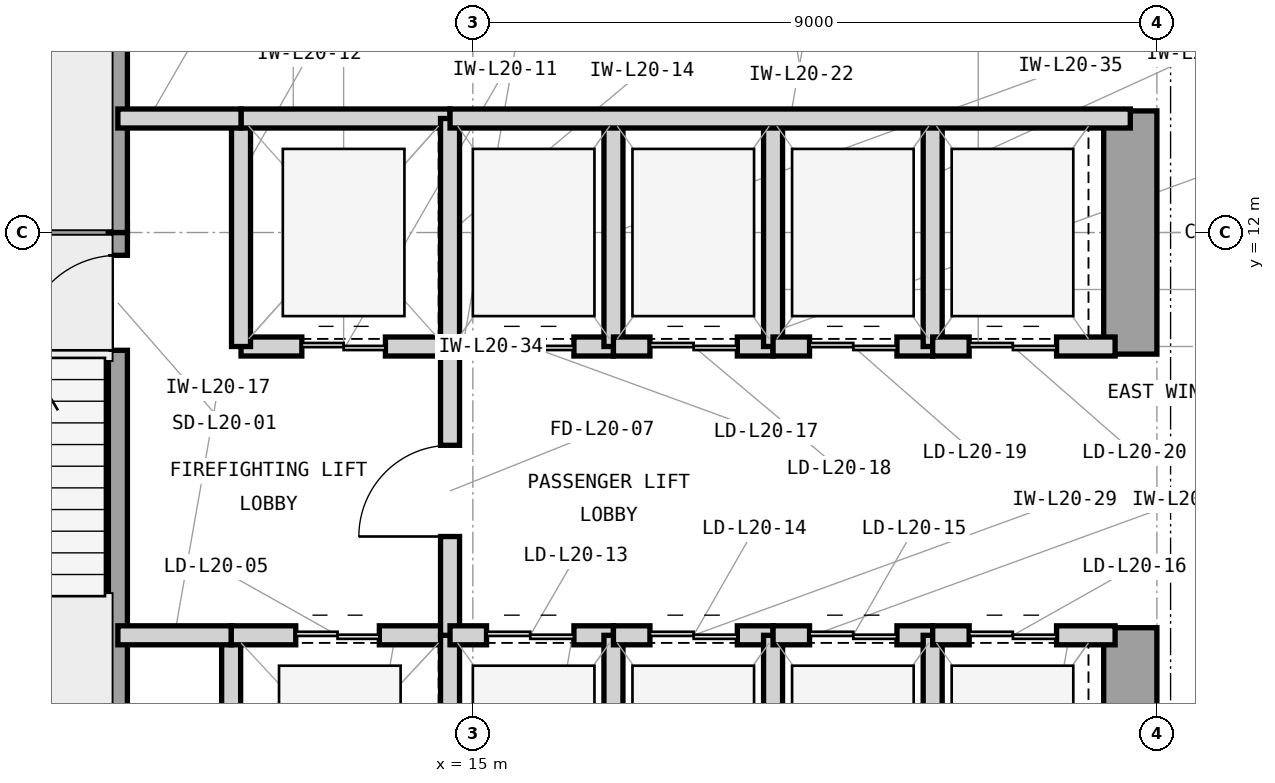
"""IFC4 building model, lengths in metres.
Left out: names, types, materials, properties, quantities, classifications, styles, units other than length and angle.
Written with IfcOpenShell. Run it as: python <this file> out.ifc"""

import sys

from ifc_helpers import new_model, si_unit, direction, frame, frame_2d, origin, place, context, subcontext, project, spatial, rectangle, extrude, element, fill, save


model = new_model("IFC4")
c1 = context("Model", 3, precision=1e-05, world=origin(), true_north=direction((0.0, 1.0)))
c2 = subcontext(c1, "Body", "Model", "MODEL_VIEW")
j1 = project(units=[si_unit("LENGTHUNIT", "METRE"), si_unit("PLANEANGLEUNIT", "RADIAN")], contexts=[c1])
p1 = place(None, origin())
s1 = spatial("IfcSite", under=j1, at=p1, CompositionType="ELEMENT")
p2 = place(p1, origin())
s2 = spatial("IfcBuilding", under=s1, at=p2, CompositionType="ELEMENT")
p3 = place(p2, frame((0.0, 0.0, 89.1)))
s3 = spatial("IfcBuildingStorey", under=s2, at=p3, CompositionType="ELEMENT", Elevation=89.1)
p4 = place(p3, frame((23.65, 3.7, 0.0), z_axis=(0.0, 0.0, 1.0), x_axis=(0.0, 1.0, 0.0)))
e1 = element("IfcWall", 1, at=p4, inside=s3, PredefinedType="SHEAR", context=c2, shape_type="SweptSolid", body=[
    extrude(rectangle(XDim=3.1, YDim=0.7, at=frame_2d((1.55, 0.0))), origin(), (0.0, 0.0, 1.0), 4.2),
])
p5 = place(p3, frame((23.65, 10.4, 0.0), z_axis=(0.0, 0.0, 1.0), x_axis=(0.0, 1.0, 0.0)))
e2 = element("IfcWall", 2, at=p5, inside=s3, PredefinedType="SHEAR", context=c2, shape_type="SweptSolid", body=[
    extrude(rectangle(XDim=3.2, YDim=0.7, at=frame_2d((1.6, 0.0))), origin(), (0.0, 0.0, 1.0), 4.2),
])
p6 = place(p3, frame((6.35, 12.0, 0.0), z_axis=(0.0, 0.0, 1.0), x_axis=(1.0, 0.0, 0.0)))
e3 = element("IfcWall", 3, at=p6, inside=s3, PredefinedType="SHEAR", context=c2, shape_type="SweptSolid", body=[
    extrude(rectangle(XDim=4.105, YDim=0.25, at=frame_2d((2.052, 0.0))), origin(), (0.0, 0.0, 1.0), 4.2),
])
p7 = place(p3, frame((10.33, 4.55, 0.0), z_axis=(0.0, 0.0, 1.0), x_axis=(0.0, 1.0, 0.0)))
e4 = element("IfcWall", 4, at=p7, inside=s3, PredefinedType="SHEAR", context=c2, shape_type="SweptSolid", body=[
    extrude(rectangle(XDim=7.45, YDim=0.25, at=frame_2d((3.725, 0.0))), origin(), (0.0, 0.0, 1.0), 4.2),
])
p8 = place(p7, frame((5.9, 0.0, 0.0)))
e5 = element("IfcOpeningElement", 5, at=p8, cuts=e4, PredefinedType="OPENING", context=c2, shape_type="SweptSolid", body=[
    extrude(rectangle(XDim=1.25, YDim=2.2, at=frame_2d((0.625, 1.1))), frame((0.0, 0.135, 0.0), z_axis=(0.0, -1.0, 0.0), x_axis=(1.0, 0.0, 0.0)), (0.0, 0.0, 1.0), 0.27),
])
p9 = place(p3, frame((10.33, 12.0, 0.0), z_axis=(0.0, 0.0, 1.0), x_axis=(0.0, 1.0, 0.0)))
e6 = element("IfcWall", 6, at=p9, inside=s3, PredefinedType="SHEAR", context=c2, shape_type="SweptSolid", body=[
    extrude(rectangle(XDim=7.45, YDim=0.25, at=frame_2d((3.725, 0.0))), origin(), (0.0, 0.0, 1.0), 4.2),
])
p10 = place(p9, frame((5.85, 0.0, 0.0)))
e7 = element("IfcOpeningElement", 7, at=p10, cuts=e6, PredefinedType="OPENING", context=c2, shape_type="SweptSolid", body=[
    extrude(rectangle(XDim=1.25, YDim=2.2, at=frame_2d((0.625, 1.1))), frame((0.0, 0.135, 0.0), z_axis=(0.0, -1.0, 0.0), x_axis=(1.0, 0.0, 0.0)), (0.0, 0.0, 1.0), 0.27),
])
p11 = place(p3, frame((11.82, 3.35, 0.0), z_axis=(0.0, 0.0, 1.0), x_axis=(0.0, 1.0, 0.0)))
e8 = element("IfcWall", 8, at=p11, inside=s3, PredefinedType="PARTITIONING", context=c2, shape_type="SweptSolid", body=[
    extrude(rectangle(XDim=3.35, YDim=0.25, at=frame_2d((1.675, 0.0))), origin(), (0.0, 0.0, 1.0), 3.93),
])
p12 = place(p3, frame((11.82, 6.7, 0.0), z_axis=(0.0, 0.0, 1.0), x_axis=(1.0, 0.0, 0.0)))
e9 = element("IfcWall", 9, at=p12, inside=s3, PredefinedType="PARTITIONING", context=c2, shape_type="SweptSolid", body=[
    extrude(rectangle(XDim=2.88, YDim=0.25, at=frame_2d((1.44, 0.0))), origin(), (0.0, 0.0, 1.0), 3.527),
])
p13 = place(p12, frame((0.85, 0.0, 0.0)))
e10 = element("IfcOpeningElement", 10, at=p13, cuts=e9, PredefinedType="OPENING", context=c2, shape_type="SweptSolid", body=[
    extrude(rectangle(XDim=1.1, YDim=2.25, at=frame_2d((0.55, 1.125))), frame((0.0, 0.135, 0.0), z_axis=(0.0, -1.0, 0.0), x_axis=(1.0, 0.0, 0.0)), (0.0, 0.0, 1.0), 0.27),
])
p14 = place(p3, frame((14.7, 3.35, 0.0), z_axis=(0.0, 0.0, 1.0), x_axis=(0.0, 1.0, 0.0)))
e11 = element("IfcWall", 11, at=p14, inside=s3, PredefinedType="PARTITIONING", context=c2, shape_type="SweptSolid", body=[
    extrude(rectangle(XDim=3.35, YDim=0.25, at=frame_2d((1.675, 0.0))), origin(), (0.0, 0.0, 1.0), 3.93),
])
p15 = place(p3, frame((11.95, 10.5, 0.0), z_axis=(0.0, 0.0, 1.0), x_axis=(1.0, 0.0, 0.0)))
e12 = element("IfcWall", 12, at=p15, inside=s3, PredefinedType="PARTITIONING", context=c2, shape_type="SweptSolid", body=[
    extrude(rectangle(XDim=2.75, YDim=0.25, at=frame_2d((1.375, 0.0))), origin(), (0.0, 0.0, 1.0), 3.527),
])
p16 = place(p15, frame((0.8, 0.0, 0.0)))
e13 = element("IfcOpeningElement", 13, at=p16, cuts=e12, PredefinedType="OPENING", context=c2, shape_type="SweptSolid", body=[
    extrude(rectangle(XDim=1.1, YDim=2.25, at=frame_2d((0.55, 1.125))), frame((0.0, 0.135, 0.0), z_axis=(0.0, -1.0, 0.0), x_axis=(1.0, 0.0, 0.0)), (0.0, 0.0, 1.0), 0.27),
])
p17 = place(p3, frame((11.95, 10.5, 0.0), z_axis=(0.0, 0.0, 1.0), x_axis=(0.0, 1.0, 0.0)))
e14 = element("IfcWall", 14, at=p17, inside=s3, PredefinedType="PARTITIONING", context=c2, shape_type="SweptSolid", body=[
    extrude(rectangle(XDim=3.0, YDim=0.25, at=frame_2d((1.5, 0.0))), origin(), (0.0, 0.0, 1.0), 3.93),
])
p18 = place(p3, frame((11.95, 13.5, 0.0), z_axis=(0.0, 0.0, 1.0), x_axis=(1.0, 0.0, 0.0)))
e15 = element("IfcWall", 15, at=p18, inside=s3, PredefinedType="PARTITIONING", context=c2, shape_type="SweptSolid", body=[
    extrude(rectangle(XDim=2.75, YDim=0.25, at=frame_2d((1.375, 0.0))), origin(), (0.0, 0.0, 1.0), 3.527),
])
p19 = place(p3, frame((14.7, 10.5, 0.0), z_axis=(0.0, 0.0, 1.0), x_axis=(0.0, 1.0, 0.0)))
e16 = element("IfcWall", 16, at=p19, inside=s3, PredefinedType="PARTITIONING", context=c2, shape_type="SweptSolid", body=[
    extrude(rectangle(XDim=3.0, YDim=0.25, at=frame_2d((1.5, 0.0))), origin(), (0.0, 0.0, 1.0), 3.93),
])
p20 = place(p3, frame((14.7, 6.7, 0.0), z_axis=(0.0, 0.0, 1.0), x_axis=(0.0, 1.0, 0.0)))
e17 = element("IfcWall", 17, at=p20, inside=s3, PredefinedType="PARTITIONING", context=c2, shape_type="SweptSolid", body=[
    extrude(rectangle(XDim=3.8, YDim=0.25, at=frame_2d((1.9, 0.0))), origin(), (0.0, 0.0, 1.0), 3.93),
])
p21 = place(p20, frame((1.3, 0.0, 0.0)))
e18 = element("IfcOpeningElement", 18, at=p21, cuts=e17, PredefinedType="OPENING", context=c2, shape_type="SweptSolid", body=[
    extrude(rectangle(XDim=1.2, YDim=2.2, at=frame_2d((0.6, 1.1))), frame((0.0, 0.135, 0.0), z_axis=(0.0, -1.0, 0.0), x_axis=(1.0, 0.0, 0.0)), (0.0, 0.0, 1.0), 0.27),
])
p22 = place(p3, frame((10.33, 13.5, 0.0), z_axis=(0.0, 0.0, 1.0), x_axis=(1.0, 0.0, 0.0)))
e19 = element("IfcWall", 19, at=p22, inside=s3, PredefinedType="PARTITIONING", context=c2, shape_type="SweptSolid", body=[
    extrude(rectangle(XDim=1.62, YDim=0.25, at=frame_2d((0.81, 0.0))), origin(), (0.0, 0.0, 1.0), 3.527),
])
p23 = place(p3, frame((10.33, 6.7, 0.0), z_axis=(0.0, 0.0, 1.0), x_axis=(1.0, 0.0, 0.0)))
e20 = element("IfcWall", 20, at=p23, inside=s3, PredefinedType="PARTITIONING", context=c2, shape_type="SweptSolid", body=[
    extrude(rectangle(XDim=1.49, YDim=0.25, at=frame_2d((0.745, 0.0))), origin(), (0.0, 0.0, 1.0), 3.527),
])
p24 = place(p3, frame((14.7, 6.7, 0.0), z_axis=(0.0, 0.0, 1.0), x_axis=(1.0, 0.0, 0.0)))
e21 = element("IfcWall", 21, at=p24, inside=s3, PredefinedType="PARTITIONING", context=c2, shape_type="SweptSolid", body=[
    extrude(rectangle(XDim=2.15, YDim=0.25, at=frame_2d((1.075, 0.0))), origin(), (0.0, 0.0, 1.0), 3.527),
])
p25 = place(p24, frame((0.48, 0.0, 0.0)))
e22 = element("IfcOpeningElement", 22, at=p25, cuts=e21, PredefinedType="OPENING", context=c2, shape_type="SweptSolid", body=[
    extrude(rectangle(XDim=1.15, YDim=2.25, at=frame_2d((0.575, 1.125))), frame((0.0, 0.135, 0.0), z_axis=(0.0, -1.0, 0.0), x_axis=(1.0, 0.0, 0.0)), (0.0, 0.0, 1.0), 0.27),
])
p26 = place(p3, frame((16.85, 3.35, 0.0), z_axis=(0.0, 0.0, 1.0), x_axis=(0.0, 1.0, 0.0)))
e23 = element("IfcWall", 23, at=p26, inside=s3, PredefinedType="PARTITIONING", context=c2, shape_type="SweptSolid", body=[
    extrude(rectangle(XDim=3.35, YDim=0.25, at=frame_2d((1.675, 0.0))), origin(), (0.0, 0.0, 1.0), 3.93),
])
p27 = place(p3, frame((16.85, 6.7, 0.0), z_axis=(0.0, 0.0, 1.0), x_axis=(1.0, 0.0, 0.0)))
e24 = element("IfcWall", 24, at=p27, inside=s3, PredefinedType="PARTITIONING", context=c2, shape_type="SweptSolid", body=[
    extrude(rectangle(XDim=2.1, YDim=0.25, at=frame_2d((1.05, 0.0))), origin(), (0.0, 0.0, 1.0), 3.527),
])
p28 = place(p27, frame((0.48, 0.0, 0.0)))
e25 = element("IfcOpeningElement", 25, at=p28, cuts=e24, PredefinedType="OPENING", context=c2, shape_type="SweptSolid", body=[
    extrude(rectangle(XDim=1.15, YDim=2.25, at=frame_2d((0.575, 1.125))), frame((0.0, 0.135, 0.0), z_axis=(0.0, -1.0, 0.0), x_axis=(1.0, 0.0, 0.0)), (0.0, 0.0, 1.0), 0.27),
])
p29 = place(p3, frame((18.95, 3.35, 0.0), z_axis=(0.0, 0.0, 1.0), x_axis=(0.0, 1.0, 0.0)))
e26 = element("IfcWall", 26, at=p29, inside=s3, PredefinedType="PARTITIONING", context=c2, shape_type="SweptSolid", body=[
    extrude(rectangle(XDim=3.35, YDim=0.25, at=frame_2d((1.675, 0.0))), origin(), (0.0, 0.0, 1.0), 3.93),
])
p30 = place(p3, frame((18.95, 6.7, 0.0), z_axis=(0.0, 0.0, 1.0), x_axis=(1.0, 0.0, 0.0)))
e27 = element("IfcWall", 27, at=p30, inside=s3, PredefinedType="PARTITIONING", context=c2, shape_type="SweptSolid", body=[
    extrude(rectangle(XDim=2.1, YDim=0.25, at=frame_2d((1.05, 0.0))), origin(), (0.0, 0.0, 1.0), 3.527),
])
p31 = place(p30, frame((0.48, 0.0, 0.0)))
e28 = element("IfcOpeningElement", 28, at=p31, cuts=e27, PredefinedType="OPENING", context=c2, shape_type="SweptSolid", body=[
    extrude(rectangle(XDim=1.15, YDim=2.25, at=frame_2d((0.575, 1.125))), frame((0.0, 0.135, 0.0), z_axis=(0.0, -1.0, 0.0), x_axis=(1.0, 0.0, 0.0)), (0.0, 0.0, 1.0), 0.27),
])
p32 = place(p3, frame((21.05, 3.35, 0.0), z_axis=(0.0, 0.0, 1.0), x_axis=(0.0, 1.0, 0.0)))
e29 = element("IfcWall", 29, at=p32, inside=s3, PredefinedType="PARTITIONING", context=c2, shape_type="SweptSolid", body=[
    extrude(rectangle(XDim=3.35, YDim=0.25, at=frame_2d((1.675, 0.0))), origin(), (0.0, 0.0, 1.0), 3.93),
])
p33 = place(p3, frame((21.05, 6.7, 0.0), z_axis=(0.0, 0.0, 1.0), x_axis=(1.0, 0.0, 0.0)))
e30 = element("IfcWall", 30, at=p33, inside=s3, PredefinedType="PARTITIONING", context=c2, shape_type="SweptSolid", body=[
    extrude(rectangle(XDim=2.4, YDim=0.25, at=frame_2d((1.2, 0.0))), origin(), (0.0, 0.0, 1.0), 3.527),
])
p34 = place(p33, frame((0.48, 0.0, 0.0)))
e31 = element("IfcOpeningElement", 31, at=p34, cuts=e30, PredefinedType="OPENING", context=c2, shape_type="SweptSolid", body=[
    extrude(rectangle(XDim=1.15, YDim=2.25, at=frame_2d((0.575, 1.125))), frame((0.0, 0.135, 0.0), z_axis=(0.0, -1.0, 0.0), x_axis=(1.0, 0.0, 0.0)), (0.0, 0.0, 1.0), 0.27),
])
p35 = place(p3, frame((14.7, 10.5, 0.0), z_axis=(0.0, 0.0, 1.0), x_axis=(1.0, 0.0, 0.0)))
e32 = element("IfcWall", 32, at=p35, inside=s3, PredefinedType="PARTITIONING", context=c2, shape_type="SweptSolid", body=[
    extrude(rectangle(XDim=2.15, YDim=0.25, at=frame_2d((1.075, 0.0))), origin(), (0.0, 0.0, 1.0), 3.527),
])
p36 = place(p35, frame((0.48, 0.0, 0.0)))
e33 = element("IfcOpeningElement", 33, at=p36, cuts=e32, PredefinedType="OPENING", context=c2, shape_type="SweptSolid", body=[
    extrude(rectangle(XDim=1.15, YDim=2.25, at=frame_2d((0.575, 1.125))), frame((0.0, 0.135, 0.0), z_axis=(0.0, -1.0, 0.0), x_axis=(1.0, 0.0, 0.0)), (0.0, 0.0, 1.0), 0.27),
])
p37 = place(p3, frame((16.85, 10.5, 0.0), z_axis=(0.0, 0.0, 1.0), x_axis=(0.0, 1.0, 0.0)))
e34 = element("IfcWall", 34, at=p37, inside=s3, PredefinedType="PARTITIONING", context=c2, shape_type="SweptSolid", body=[
    extrude(rectangle(XDim=3.0, YDim=0.25, at=frame_2d((1.5, 0.0))), origin(), (0.0, 0.0, 1.0), 3.93),
])
p38 = place(p3, frame((16.85, 10.5, 0.0), z_axis=(0.0, 0.0, 1.0), x_axis=(1.0, 0.0, 0.0)))
e35 = element("IfcWall", 35, at=p38, inside=s3, PredefinedType="PARTITIONING", context=c2, shape_type="SweptSolid", body=[
    extrude(rectangle(XDim=2.1, YDim=0.25, at=frame_2d((1.05, 0.0))), origin(), (0.0, 0.0, 1.0), 3.527),
])
p39 = place(p38, frame((0.48, 0.0, 0.0)))
e36 = element("IfcOpeningElement", 36, at=p39, cuts=e35, PredefinedType="OPENING", context=c2, shape_type="SweptSolid", body=[
    extrude(rectangle(XDim=1.15, YDim=2.25, at=frame_2d((0.575, 1.125))), frame((0.0, 0.135, 0.0), z_axis=(0.0, -1.0, 0.0), x_axis=(1.0, 0.0, 0.0)), (0.0, 0.0, 1.0), 0.27),
])
p40 = place(p3, frame((18.95, 10.5, 0.0), z_axis=(0.0, 0.0, 1.0), x_axis=(0.0, 1.0, 0.0)))
e37 = element("IfcWall", 37, at=p40, inside=s3, PredefinedType="PARTITIONING", context=c2, shape_type="SweptSolid", body=[
    extrude(rectangle(XDim=3.0, YDim=0.25, at=frame_2d((1.5, 0.0))), origin(), (0.0, 0.0, 1.0), 3.93),
])
p41 = place(p3, frame((18.95, 10.5, 0.0), z_axis=(0.0, 0.0, 1.0), x_axis=(1.0, 0.0, 0.0)))
e38 = element("IfcWall", 38, at=p41, inside=s3, PredefinedType="PARTITIONING", context=c2, shape_type="SweptSolid", body=[
    extrude(rectangle(XDim=2.1, YDim=0.25, at=frame_2d((1.05, 0.0))), origin(), (0.0, 0.0, 1.0), 3.527),
])
p42 = place(p41, frame((0.48, 0.0, 0.0)))
e39 = element("IfcOpeningElement", 39, at=p42, cuts=e38, PredefinedType="OPENING", context=c2, shape_type="SweptSolid", body=[
    extrude(rectangle(XDim=1.15, YDim=2.25, at=frame_2d((0.575, 1.125))), frame((0.0, 0.135, 0.0), z_axis=(0.0, -1.0, 0.0), x_axis=(1.0, 0.0, 0.0)), (0.0, 0.0, 1.0), 0.27),
])
p43 = place(p3, frame((21.05, 10.5, 0.0), z_axis=(0.0, 0.0, 1.0), x_axis=(0.0, 1.0, 0.0)))
e40 = element("IfcWall", 40, at=p43, inside=s3, PredefinedType="PARTITIONING", context=c2, shape_type="SweptSolid", body=[
    extrude(rectangle(XDim=3.0, YDim=0.25, at=frame_2d((1.5, 0.0))), origin(), (0.0, 0.0, 1.0), 3.93),
])
p44 = place(p3, frame((21.05, 10.5, 0.0), z_axis=(0.0, 0.0, 1.0), x_axis=(1.0, 0.0, 0.0)))
e41 = element("IfcWall", 41, at=p44, inside=s3, PredefinedType="PARTITIONING", context=c2, shape_type="SweptSolid", body=[
    extrude(rectangle(XDim=2.4, YDim=0.25, at=frame_2d((1.2, 0.0))), origin(), (0.0, 0.0, 1.0), 3.527),
])
p45 = place(p44, frame((0.48, 0.0, 0.0)))
e42 = element("IfcOpeningElement", 42, at=p45, cuts=e41, PredefinedType="OPENING", context=c2, shape_type="SweptSolid", body=[
    extrude(rectangle(XDim=1.15, YDim=2.25, at=frame_2d((0.575, 1.125))), frame((0.0, 0.135, 0.0), z_axis=(0.0, -1.0, 0.0), x_axis=(1.0, 0.0, 0.0)), (0.0, 0.0, 1.0), 0.27),
])
p46 = place(p3, frame((14.7, 13.5, 0.0), z_axis=(0.0, 0.0, 1.0), x_axis=(1.0, 0.0, 0.0)))
e43 = element("IfcWall", 43, at=p46, inside=s3, PredefinedType="PARTITIONING", context=c2, shape_type="SweptSolid", body=[
    extrude(rectangle(XDim=8.95, YDim=0.25, at=frame_2d((4.475, 0.0))), origin(), (0.0, 0.0, 1.0), 3.527),
])
p47 = place(p8, origin())
e44 = element("IfcDoor", 44, at=p47, inside=s3, OperationType="SINGLE_SWING_LEFT", PredefinedType="DOOR", context=c2, shape_type="SweptSolid", body=[
    extrude(rectangle(XDim=1.25, YDim=2.2, at=frame_2d((0.625, 1.1))), frame((0.0, 0.025, 0.0), z_axis=(0.0, -1.0, 0.0), x_axis=(1.0, 0.0, 0.0)), (0.0, 0.0, 1.0), 0.05),
])
fill(e5, e44)
p48 = place(p13, origin())
e45 = element("IfcDoor", 45, at=p48, inside=s3, OperationType="DOUBLE_DOOR_SLIDING", PredefinedType="DOOR", context=c2, shape_type="SweptSolid", body=[
    extrude(rectangle(XDim=1.1, YDim=2.25, at=frame_2d((0.55, 1.125))), frame((0.0, 0.025, 0.0), z_axis=(0.0, -1.0, 0.0), x_axis=(1.0, 0.0, 0.0)), (0.0, 0.0, 1.0), 0.05),
])
fill(e10, e45)
p49 = place(p16, origin())
e46 = element("IfcDoor", 46, at=p49, inside=s3, OperationType="DOUBLE_DOOR_SLIDING", PredefinedType="DOOR", context=c2, shape_type="SweptSolid", body=[
    extrude(rectangle(XDim=1.1, YDim=2.25, at=frame_2d((0.55, 1.125))), frame((0.0, 0.025, 0.0), z_axis=(0.0, -1.0, 0.0), x_axis=(1.0, 0.0, 0.0)), (0.0, 0.0, 1.0), 0.05),
])
fill(e13, e46)
p50 = place(p21, origin())
e47 = element("IfcDoor", 47, at=p50, inside=s3, OperationType="SINGLE_SWING_LEFT", PredefinedType="DOOR", context=c2, shape_type="SweptSolid", body=[
    extrude(rectangle(XDim=1.2, YDim=2.2, at=frame_2d((0.6, 1.1))), frame((0.0, 0.025, 0.0), z_axis=(0.0, -1.0, 0.0), x_axis=(1.0, 0.0, 0.0)), (0.0, 0.0, 1.0), 0.05),
])
fill(e18, e47)
p51 = place(p25, origin())
e48 = element("IfcDoor", 48, at=p51, inside=s3, OperationType="DOUBLE_DOOR_SLIDING", PredefinedType="DOOR", context=c2, shape_type="SweptSolid", body=[
    extrude(rectangle(XDim=1.15, YDim=2.25, at=frame_2d((0.575, 1.125))), frame((0.0, 0.025, 0.0), z_axis=(0.0, -1.0, 0.0), x_axis=(1.0, 0.0, 0.0)), (0.0, 0.0, 1.0), 0.05),
])
fill(e22, e48)
p52 = place(p28, origin())
e49 = element("IfcDoor", 49, at=p52, inside=s3, OperationType="DOUBLE_DOOR_SLIDING", PredefinedType="DOOR", context=c2, shape_type="SweptSolid", body=[
    extrude(rectangle(XDim=1.15, YDim=2.25, at=frame_2d((0.575, 1.125))), frame((0.0, 0.025, 0.0), z_axis=(0.0, -1.0, 0.0), x_axis=(1.0, 0.0, 0.0)), (0.0, 0.0, 1.0), 0.05),
])
fill(e25, e49)
p53 = place(p31, origin())
e50 = element("IfcDoor", 50, at=p53, inside=s3, OperationType="DOUBLE_DOOR_SLIDING", PredefinedType="DOOR", context=c2, shape_type="SweptSolid", body=[
    extrude(rectangle(XDim=1.15, YDim=2.25, at=frame_2d((0.575, 1.125))), frame((0.0, 0.025, 0.0), z_axis=(0.0, -1.0, 0.0), x_axis=(1.0, 0.0, 0.0)), (0.0, 0.0, 1.0), 0.05),
])
fill(e28, e50)
p54 = place(p34, origin())
e51 = element("IfcDoor", 51, at=p54, inside=s3, OperationType="DOUBLE_DOOR_SLIDING", PredefinedType="DOOR", context=c2, shape_type="SweptSolid", body=[
    extrude(rectangle(XDim=1.15, YDim=2.25, at=frame_2d((0.575, 1.125))), frame((0.0, 0.025, 0.0), z_axis=(0.0, -1.0, 0.0), x_axis=(1.0, 0.0, 0.0)), (0.0, 0.0, 1.0), 0.05),
])
fill(e31, e51)
p55 = place(p36, origin())
e52 = element("IfcDoor", 52, at=p55, inside=s3, OperationType="DOUBLE_DOOR_SLIDING", PredefinedType="DOOR", context=c2, shape_type="SweptSolid", body=[
    extrude(rectangle(XDim=1.15, YDim=2.25, at=frame_2d((0.575, 1.125))), frame((0.0, 0.025, 0.0), z_axis=(0.0, -1.0, 0.0), x_axis=(1.0, 0.0, 0.0)), (0.0, 0.0, 1.0), 0.05),
])
fill(e33, e52)
p56 = place(p39, origin())
e53 = element("IfcDoor", 53, at=p56, inside=s3, OperationType="DOUBLE_DOOR_SLIDING", PredefinedType="DOOR", context=c2, shape_type="SweptSolid", body=[
    extrude(rectangle(XDim=1.15, YDim=2.25, at=frame_2d((0.575, 1.125))), frame((0.0, 0.025, 0.0), z_axis=(0.0, -1.0, 0.0), x_axis=(1.0, 0.0, 0.0)), (0.0, 0.0, 1.0), 0.05),
])
fill(e36, e53)
p57 = place(p42, origin())
e54 = element("IfcDoor", 54, at=p57, inside=s3, OperationType="DOUBLE_DOOR_SLIDING", PredefinedType="DOOR", context=c2, shape_type="SweptSolid", body=[
    extrude(rectangle(XDim=1.15, YDim=2.25, at=frame_2d((0.575, 1.125))), frame((0.0, 0.025, 0.0), z_axis=(0.0, -1.0, 0.0), x_axis=(1.0, 0.0, 0.0)), (0.0, 0.0, 1.0), 0.05),
])
fill(e39, e54)
p58 = place(p45, origin())
e55 = element("IfcDoor", 55, at=p58, inside=s3, OperationType="DOUBLE_DOOR_SLIDING", PredefinedType="DOOR", context=c2, shape_type="SweptSolid", body=[
    extrude(rectangle(XDim=1.15, YDim=2.25, at=frame_2d((0.575, 1.125))), frame((0.0, 0.025, 0.0), z_axis=(0.0, -1.0, 0.0), x_axis=(1.0, 0.0, 0.0)), (0.0, 0.0, 1.0), 0.05),
])
fill(e42, e55)
save(model, sys.argv[1])
